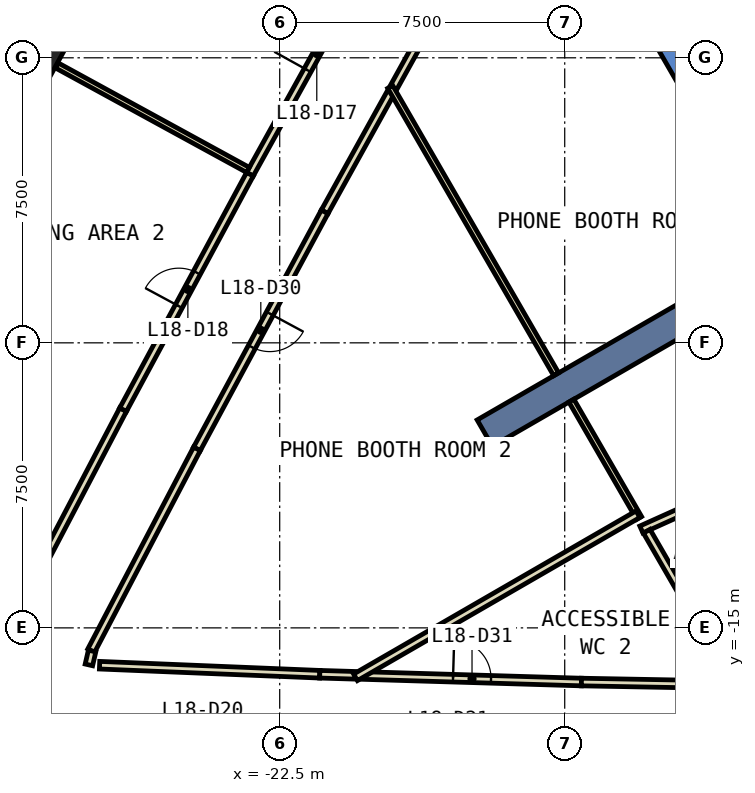
"""IFC4 building model, lengths in metres.
Left out: names, types, materials, properties, quantities, classifications, styles, units other than length and angle.
Written with IfcOpenShell. Run it as: python <this file> out.ifc"""

import sys

from ifc_helpers import new_model, si_unit, direction, frame, frame_2d, origin, origin_2d, place, context, subcontext, project, spatial, polyline, rectangle, outline, extrude, element, fill, save


model = new_model("IFC4")
c1 = context("Model", 3, precision=1e-05, world=origin(), true_north=direction((0.0, 1.0)))
c2 = subcontext(c1, "Body", "Model", "MODEL_VIEW")
j1 = project(units=[si_unit("LENGTHUNIT", "METRE"), si_unit("PLANEANGLEUNIT", "RADIAN")], contexts=[c1])
p1 = place(None, origin())
s1 = spatial("IfcSite", under=j1, at=p1, CompositionType="ELEMENT")
p2 = place(p1, origin())
s2 = spatial("IfcBuilding", under=s1, at=p2, CompositionType="ELEMENT")
p3 = place(p2, frame((0.0, 0.0, 86.6)))
s3 = spatial("IfcBuildingStorey", under=s2, at=p3, CompositionType="ELEMENT", Elevation=86.6)
p4 = place(p3, frame((-29.039, 0.167, 0.0), z_axis=(0.0, 0.0, 1.0), x_axis=(0.479611016922, 0.87748120917, 0.0)))
e1 = element("IfcColumn", 1, at=p4, inside=s3, PredefinedType="COLUMN", context=c2, shape_type="SweptSolid", body=[
    extrude(rectangle(XDim=1.1, YDim=1.5, at=origin_2d()), origin(), (0.0, 0.0, 1.0), 3.8),
])
p5 = place(p3, frame((0.0, 0.0, -0.6)))
e2 = element("IfcWall", 2, at=p5, inside=s3, PredefinedType="SHEAR", context=c2, shape_type="SweptSolid", body=[
    extrude(outline(polyline([(-13.856, 2.5), (-6.928, -9.5), (-6.409, -8.6), (-12.817, 2.5), (-13.856, 2.5)])), origin(), (0.0, 0.0, 1.0), 4.4),
])
p6 = place(p3, frame((-9.31, -5.375, -0.6), z_axis=(0.0, 0.0, 1.0), x_axis=(-0.866017533419, -0.500013631625, 0.0)))
e3 = element("IfcWall", 3, at=p6, inside=s3, PredefinedType="SHEAR", context=c2, shape_type="SweptSolid", body=[
    extrude(rectangle(XDim=9.0, YDim=0.8, at=frame_2d((4.5, 0.0))), origin(), (0.0, 0.0, 1.0), 4.4),
])
p7 = place(p3, frame((-17.883, 2.143, 0.0), z_axis=(0.0, 0.0, 1.0), x_axis=(-0.484695523805, -0.874682942101, 0.0)))
e4 = element("IfcWall", 4, at=p7, inside=s3, PredefinedType="PARTITIONING", context=c2, shape_type="SweptSolid", body=[
    extrude(rectangle(XDim=3.349, YDim=0.2, at=frame_2d((1.674, 0.0))), origin(), (0.0, 0.0, 1.0), 3.8),
])
p8 = place(p3, frame((-19.579, -0.917, 0.0), z_axis=(0.0, 0.0, 1.0), x_axis=(-0.484700239797, -0.874680328772, 0.0)))
e5 = element("IfcWall", 5, at=p8, inside=s3, PredefinedType="PARTITIONING", context=c2, shape_type="SweptSolid", body=[
    extrude(rectangle(XDim=3.585, YDim=0.2, at=frame_2d((1.792, 0.0))), origin(), (0.0, 0.0, 1.0), 3.8),
])
p9 = place(p3, frame((-21.317, -4.053, 0.0), z_axis=(0.0, 0.0, 1.0), x_axis=(-0.474391588657, -0.880313932987, 0.0)))
e6 = element("IfcWall", 6, at=p9, inside=s3, PredefinedType="PARTITIONING", context=c2, shape_type="SweptSolid", body=[
    extrude(rectangle(XDim=7.085, YDim=0.2, at=frame_2d((3.542, 0.0))), origin(), (0.0, 0.0, 1.0), 3.8),
])
p10 = place(p9, frame((3.042, 0.0, 0.0)))
e7 = element("IfcOpeningElement", 7, at=p10, cuts=e6, PredefinedType="OPENING", context=c2, shape_type="SweptSolid", body=[
    extrude(rectangle(XDim=1.0, YDim=2.1, at=frame_2d((0.5, 1.05))), frame((0.0, 0.11, 0.0), z_axis=(0.0, -1.0, 0.0), x_axis=(1.0, 0.0, 0.0)), (0.0, 0.0, 1.0), 0.22),
])
p11 = place(p3, frame((-24.678, -10.29, 0.0), z_axis=(0.0, 0.0, 1.0), x_axis=(-0.464203280494, -0.885728691179, 0.0)))
e8 = element("IfcWall", 8, at=p11, inside=s3, PredefinedType="PARTITIONING", context=c2, shape_type="SweptSolid", body=[
    extrude(rectangle(XDim=5.995, YDim=0.2, at=frame_2d((2.998, 0.0))), origin(), (0.0, 0.0, 1.0), 3.8),
])
p12 = place(p3, frame((-27.437, -15.609, 0.0), z_axis=(0.0, 0.0, 1.0), x_axis=(-0.224098195188, -0.97456656977, 0.0)))
e9 = element("IfcWall", 9, at=p12, inside=s3, PredefinedType="PARTITIONING", context=c2, shape_type="SweptSolid", body=[
    extrude(rectangle(XDim=0.375, YDim=0.2, at=frame_2d((0.188, 0.0))), origin(), (0.0, 0.0, 1.0), 3.8),
])
p13 = place(p3, frame((-27.24, -15.982, 0.0), z_axis=(0.0, 0.0, 1.0), x_axis=(0.999157128819, -0.041049140426, 0.0)))
e10 = element("IfcWall", 10, at=p13, inside=s3, PredefinedType="PARTITIONING", context=c2, shape_type="SweptSolid", body=[
    extrude(rectangle(XDim=5.799, YDim=0.2, at=frame_2d((2.899, 0.0))), origin(), (0.0, 0.0, 1.0), 3.8),
])
p14 = place(p3, frame((-21.446, -16.22, 0.0), z_axis=(0.0, 0.0, 1.0), x_axis=(0.999542625536, -0.030241358047, 0.0)))
e11 = element("IfcWall", 11, at=p14, inside=s3, PredefinedType="PARTITIONING", context=c2, shape_type="SweptSolid", body=[
    extrude(rectangle(XDim=0.928, YDim=0.2, at=frame_2d((0.464, 0.0))), origin(), (0.0, 0.0, 1.0), 3.8),
])
p15 = place(p3, frame((-20.318, -16.253, 0.0), z_axis=(0.0, 0.0, 1.0), x_axis=(0.999553385537, -0.029883598524, 0.0)))
e12 = element("IfcWall", 12, at=p15, inside=s3, PredefinedType="PARTITIONING", context=c2, shape_type="SweptSolid", body=[
    extrude(rectangle(XDim=5.76, YDim=0.2, at=frame_2d((2.88, 0.0))), origin(), (0.0, 0.0, 1.0), 3.8),
])
p16 = place(p15, frame((2.38, 0.0, 0.0)))
e13 = element("IfcOpeningElement", 13, at=p16, cuts=e12, PredefinedType="OPENING", context=c2, shape_type="SweptSolid", body=[
    extrude(rectangle(XDim=1.0, YDim=2.1, at=frame_2d((0.5, 1.05))), frame((0.0, 0.11, 0.0), z_axis=(0.0, -1.0, 0.0), x_axis=(1.0, 0.0, 0.0)), (0.0, 0.0, 1.0), 0.22),
])
p17 = place(p3, frame((-14.561, -16.425, 0.0), z_axis=(0.0, 0.0, 1.0), x_axis=(0.999829548691, -0.018462761553, 0.0)))
e14 = element("IfcWall", 14, at=p17, inside=s3, PredefinedType="PARTITIONING", context=c2, shape_type="SweptSolid", body=[
    extrude(rectangle(XDim=3.954, YDim=0.2, at=frame_2d((1.977, 0.0))), origin(), (0.0, 0.0, 1.0), 3.8),
])
p18 = place(p3, frame((-23.284, -3.064, 0.0), z_axis=(0.0, 0.0, 1.0), x_axis=(0.48478560119, 0.874633020689, 0.0)))
e15 = element("IfcWall", 15, at=p18, inside=s3, PredefinedType="PARTITIONING", context=c2, shape_type="SweptSolid", body=[
    extrude(rectangle(XDim=7.11, YDim=0.2, at=frame_2d((3.555, 0.0))), origin(), (0.0, 0.0, 1.0), 3.8),
])
p19 = place(p18, frame((3.13, 0.0, 0.0)))
e16 = element("IfcOpeningElement", 16, at=p19, cuts=e15, PredefinedType="OPENING", context=c2, shape_type="SweptSolid", body=[
    extrude(rectangle(XDim=1.0, YDim=2.1, at=frame_2d((0.5, 1.05))), frame((0.0, 0.11, 0.0), z_axis=(0.0, -1.0, 0.0), x_axis=(1.0, 0.0, 0.0)), (0.0, 0.0, 1.0), 0.22),
])
p20 = place(p3, frame((-29.541, -14.829, 0.0), z_axis=(0.0, 0.0, 1.0), x_axis=(0.46422598759, 0.885716790202, 0.0)))
e17 = element("IfcWall", 17, at=p20, inside=s3, PredefinedType="PARTITIONING", context=c2, shape_type="SweptSolid", body=[
    extrude(rectangle(XDim=6.29, YDim=0.2, at=frame_2d((3.145, 0.0))), origin(), (0.0, 0.0, 1.0), 3.8),
])
p21 = place(p3, frame((-26.621, -9.258, 0.0), z_axis=(0.0, 0.0, 1.0), x_axis=(0.474414295505, 0.880301696136, 0.0)))
e18 = element("IfcWall", 18, at=p21, inside=s3, PredefinedType="PARTITIONING", context=c2, shape_type="SweptSolid", body=[
    extrude(rectangle(XDim=7.036, YDim=0.2, at=frame_2d((3.518, 0.0))), origin(), (0.0, 0.0, 1.0), 3.8),
])
p22 = place(p21, frame((3.093, 0.0, 0.0)))
e19 = element("IfcOpeningElement", 19, at=p22, cuts=e18, PredefinedType="OPENING", context=c2, shape_type="SweptSolid", body=[
    extrude(rectangle(XDim=1.0, YDim=2.1, at=frame_2d((0.5, 1.05))), frame((0.0, 0.11, 0.0), z_axis=(0.0, -1.0, 0.0), x_axis=(1.0, 0.0, 0.0)), (0.0, 0.0, 1.0), 0.22),
])
p23 = place(p3, frame((-7.8, -10.08, 0.0), z_axis=(0.0, 0.0, 1.0), x_axis=(-0.911938383636, -0.410327167577, 0.0)))
e20 = element("IfcWall", 20, at=p23, inside=s3, PredefinedType="PARTITIONING", context=c2, shape_type="SweptSolid", body=[
    extrude(rectangle(XDim=5.683, YDim=0.2, at=frame_2d((2.842, 0.0))), origin(), (0.0, 0.0, 1.0), 3.8),
])
p24 = place(p3, frame((-13.043, -12.108, 0.0), z_axis=(0.0, 0.0, 1.0), x_axis=(-0.499947764329, 0.866055559963, 0.0)))
e21 = element("IfcWall", 21, at=p24, inside=s3, PredefinedType="PARTITIONING", context=c2, shape_type="SweptSolid", body=[
    extrude(rectangle(XDim=3.564, YDim=0.15, at=frame_2d((1.782, 0.0))), origin(), (0.0, 0.0, 1.0), 3.8),
])
p25 = place(p3, frame((-10.458, -16.586, 0.0), z_axis=(0.0, 0.0, 1.0), x_axis=(-0.500121439648, 0.865955279218, 0.0)))
e22 = element("IfcWall", 22, at=p25, inside=s3, PredefinedType="PARTITIONING", context=c2, shape_type="SweptSolid", body=[
    extrude(rectangle(XDim=4.767, YDim=0.2, at=frame_2d((2.383, 0.0))), origin(), (0.0, 0.0, 1.0), 3.8),
])
p26 = place(p3, frame((-13.072, -12.009, 0.0), z_axis=(0.0, 0.0, 1.0), x_axis=(-0.865993734772, -0.500054848326, 0.0)))
e23 = element("IfcWall", 23, at=p26, inside=s3, PredefinedType="PARTITIONING", context=c2, shape_type="SweptSolid", body=[
    extrude(rectangle(XDim=8.583, YDim=0.2, at=frame_2d((4.292, 0.0))), origin(), (0.0, 0.0, 1.0), 3.8),
])
p27 = place(p3, frame((-23.336, -2.95, 0.0), z_axis=(0.0, 0.0, 1.0), x_axis=(-0.877455496162, 0.479658057637, 0.0)))
e24 = element("IfcWall", 24, at=p27, inside=s3, PredefinedType="PARTITIONING", context=c2, shape_type="SweptSolid", body=[
    extrude(rectangle(XDim=5.729, YDim=0.15, at=frame_2d((2.865, 0.0))), origin(), (0.0, 0.0, 1.0), 3.8),
])
p28 = place(p3, frame((-15.225, -8.328, 0.0), z_axis=(0.0, 0.0, 1.0), x_axis=(-0.500038648455, 0.866003088939, 0.0)))
e25 = element("IfcWall", 25, at=p28, inside=s3, PredefinedType="PARTITIONING", context=c2, shape_type="SweptSolid", body=[
    extrude(rectangle(XDim=8.733, YDim=0.15, at=frame_2d((4.367, 0.0))), origin(), (0.0, 0.0, 1.0), 3.8),
])
p29 = place(p19, origin())
e26 = element("IfcDoor", 26, at=p29, inside=s3, OperationType="SINGLE_SWING_LEFT", PredefinedType="DOOR", context=c2, shape_type="SweptSolid", body=[
    extrude(rectangle(XDim=1.0, YDim=2.1, at=frame_2d((0.5, 1.05))), frame((0.0, 0.025, 0.0), z_axis=(0.0, -1.0, 0.0), x_axis=(1.0, 0.0, 0.0)), (0.0, 0.0, 1.0), 0.05),
])
fill(e16, e26)
p30 = place(p22, origin())
e27 = element("IfcDoor", 27, at=p30, inside=s3, OperationType="SINGLE_SWING_LEFT", PredefinedType="DOOR", context=c2, shape_type="SweptSolid", body=[
    extrude(rectangle(XDim=1.0, YDim=2.1, at=frame_2d((0.5, 1.05))), frame((0.0, 0.025, 0.0), z_axis=(0.0, -1.0, 0.0), x_axis=(1.0, 0.0, 0.0)), (0.0, 0.0, 1.0), 0.05),
])
fill(e19, e27)
p31 = place(p10, origin())
e28 = element("IfcDoor", 28, at=p31, inside=s3, OperationType="SINGLE_SWING_RIGHT", PredefinedType="DOOR", context=c2, shape_type="SweptSolid", body=[
    extrude(rectangle(XDim=1.0, YDim=2.1, at=frame_2d((0.5, 1.05))), frame((0.0, 0.025, 0.0), z_axis=(0.0, -1.0, 0.0), x_axis=(1.0, 0.0, 0.0)), (0.0, 0.0, 1.0), 0.05),
])
fill(e7, e28)
p32 = place(p16, origin())
e29 = element("IfcDoor", 29, at=p32, inside=s3, OperationType="SINGLE_SWING_LEFT", PredefinedType="DOOR", context=c2, shape_type="SweptSolid", body=[
    extrude(rectangle(XDim=1.0, YDim=2.1, at=frame_2d((0.5, 1.05))), frame((0.0, 0.025, 0.0), z_axis=(0.0, -1.0, 0.0), x_axis=(1.0, 0.0, 0.0)), (0.0, 0.0, 1.0), 0.05),
])
fill(e13, e29)
save(model, sys.argv[1])
